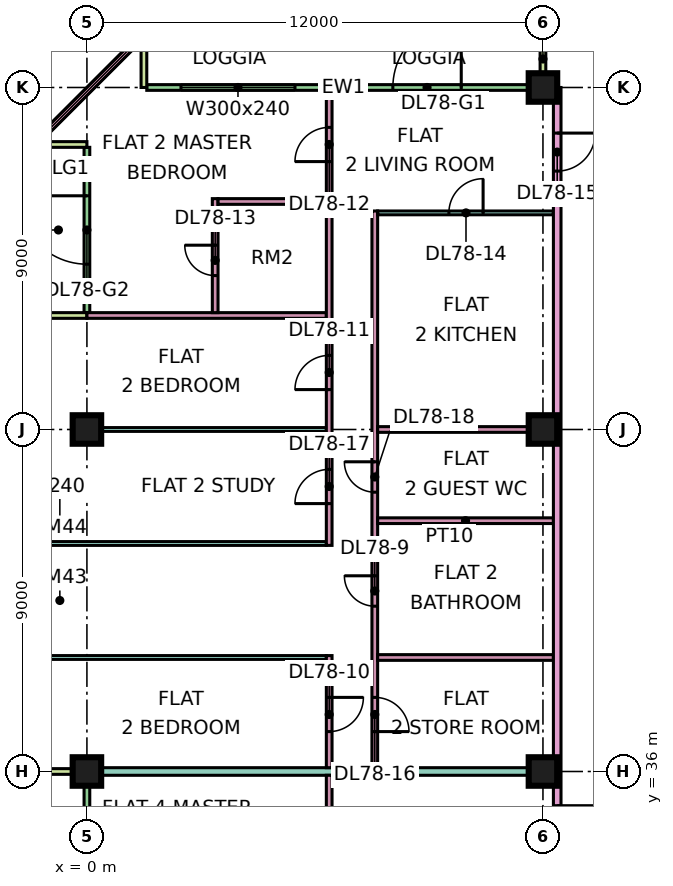
"""IFC4 building model, lengths in metres.
Left out: names, types, materials, properties, quantities, classifications, styles, units other than length and angle.
Written with IfcOpenShell. Run it as: python <this file> out.ifc"""

import sys

from ifc_helpers import new_model, si_unit, direction, frame, frame_2d, origin, origin_2d, place, context, subcontext, project, spatial, rectangle, extrude, element, fill, save


model = new_model("IFC4")
c1 = context("Model", 3, precision=1e-05, world=origin(), true_north=direction((0.0, 1.0)))
c2 = subcontext(c1, "Body", "Model", "MODEL_VIEW")
j1 = project(units=[si_unit("LENGTHUNIT", "METRE"), si_unit("PLANEANGLEUNIT", "RADIAN")], contexts=[c1])
p1 = place(None, origin())
s1 = spatial("IfcSite", under=j1, at=p1, CompositionType="ELEMENT")
p2 = place(p1, origin())
s2 = spatial("IfcBuilding", under=s1, at=p2, CompositionType="ELEMENT")
p3 = place(p2, frame((0.0, 0.0, 338.9)))
s3 = spatial("IfcBuildingStorey", under=s2, at=p3, CompositionType="ELEMENT", Elevation=338.9)
p4 = place(p3, frame((0.0, 36.0, 0.0), z_axis=(0.0, 0.0, 1.0), x_axis=(1.0, 0.0, 0.0)))
e1 = element("IfcColumn", 1, at=p4, inside=s3, PredefinedType="COLUMN", context=c2, shape_type="SweptSolid", body=[
    extrude(rectangle(XDim=0.75, YDim=0.75, at=origin_2d()), origin(), (0.0, 0.0, 1.0), 3.75),
])
p5 = place(p3, frame((0.0, 45.0, 0.0), z_axis=(0.0, 0.0, 1.0), x_axis=(1.0, 0.0, 0.0)))
e2 = element("IfcColumn", 2, at=p5, inside=s3, PredefinedType="COLUMN", context=c2, shape_type="SweptSolid", body=[
    extrude(rectangle(XDim=0.75, YDim=0.75, at=origin_2d()), origin(), (0.0, 0.0, 1.0), 3.75),
])
for number, where, z_axis, x_axis in (
    (3, (12.0, 36.0, 0.0), (0.0, 0.0, 1.0), (1.0, 0.0, 0.0)),
    (4, (12.0, 45.0, 0.0), (0.0, 0.0, 1.0), (1.0, 0.0, 0.0)),
    (5, (12.0, 54.0, 0.0), (0.0, 0.0, 1.0), (1.0, 0.0, 0.0)),
):
    element("IfcColumn", number, at=place(p3, frame(where, z_axis=z_axis, x_axis=x_axis)), inside=s3, PredefinedType="COLUMN", context=c2, shape_type="SweptSolid", body=[
        extrude(rectangle(XDim=0.75, YDim=0.75, at=origin_2d()), origin(), (0.0, 0.0, 1.0), 3.75),
    ])
p6 = place(p3, frame((11.925, 54.0, 0.0), z_axis=(0.0, 0.0, 1.0), x_axis=(-1.0, 0.0, 0.0)))
e6 = element("IfcWall", 6, at=p6, inside=s3, PredefinedType="SOLIDWALL", context=c2, shape_type="SweptSolid", body=[
    extrude(rectangle(XDim=10.35, YDim=0.15, at=frame_2d((5.175, 0.0))), origin(), (0.0, 0.0, 1.0), 3.35),
])
p7 = place(p6, frame((2.075, 0.0, 0.0)))
e7 = element("IfcOpeningElement", 7, at=p7, cuts=e6, PredefinedType="OPENING", context=c2, shape_type="SweptSolid", body=[
    extrude(rectangle(XDim=1.8, YDim=2.4, at=frame_2d((0.9, 1.2))), frame((0.0, 0.085, 0.0), z_axis=(0.0, -1.0, 0.0), x_axis=(1.0, 0.0, 0.0)), (0.0, 0.0, 1.0), 0.17),
])
p8 = place(p6, frame((6.45, 0.0, 0.45)))
e8 = element("IfcOpeningElement", 8, at=p8, cuts=e6, PredefinedType="OPENING", context=c2, shape_type="SweptSolid", body=[
    extrude(rectangle(XDim=3.0, YDim=2.4, at=frame_2d((1.5, 1.2))), frame((0.0, 0.085, 0.0), z_axis=(0.0, -1.0, 0.0), x_axis=(1.0, 0.0, 0.0)), (0.0, 0.0, 1.0), 0.17),
])
for number, where, z_axis, x_axis in (
    (9, (12.0, 55.5, 0.0), (0.0, 0.0, 1.0), (0.0, -1.0, 0.0)),
    (10, (1.5, 55.5, 0.0), (0.0, 0.0, 1.0), (0.0, -1.0, 0.0)),
):
    element("IfcWall", number, at=place(p3, frame(where, z_axis=z_axis, x_axis=x_axis)), inside=s3, PredefinedType="SOLIDWALL", context=c2, shape_type="SweptSolid", body=[
        extrude(rectangle(XDim=1.5, YDim=0.15, at=frame_2d((0.75, 0.0))), origin(), (0.0, 0.0, 1.0), 3.35),
    ])
p9 = place(p3, frame((1.553, 55.447, 0.0), z_axis=(0.0, 0.0, 1.0), x_axis=(-0.707106781187, -0.707106781187, 0.0)))
e11 = element("IfcWall", 11, at=p9, inside=s3, PredefinedType="SOLIDWALL", context=c2, shape_type="SweptSolid", body=[
    extrude(rectangle(XDim=4.243, YDim=0.15, at=frame_2d((2.121, 0.0))), origin(), (0.0, 0.0, 1.0), 3.35),
])
p10 = place(p9, frame((0.621, 0.0, 0.45)))
e12 = element("IfcOpeningElement", 12, at=p10, cuts=e11, PredefinedType="OPENING", context=c2, shape_type="SweptSolid", body=[
    extrude(rectangle(XDim=3.0, YDim=2.4, at=frame_2d((1.5, 1.2))), frame((0.0, 0.085, 0.0), z_axis=(0.0, -1.0, 0.0), x_axis=(1.0, 0.0, 0.0)), (0.0, 0.0, 1.0), 0.17),
])
p11 = place(p3, frame((0.0, 52.425, 0.0), z_axis=(0.0, 0.0, 1.0), x_axis=(0.0, -1.0, 0.0)))
e13 = element("IfcWall", 13, at=p11, inside=s3, PredefinedType="SOLIDWALL", context=c2, shape_type="SweptSolid", body=[
    extrude(rectangle(XDim=4.35, YDim=0.15, at=frame_2d((2.175, 0.0))), origin(), (0.0, 0.0, 1.0), 3.35),
])
p12 = place(p11, frame((1.275, 0.0, 0.0)))
e14 = element("IfcOpeningElement", 14, at=p12, cuts=e13, PredefinedType="OPENING", context=c2, shape_type="SweptSolid", body=[
    extrude(rectangle(XDim=1.8, YDim=2.4, at=frame_2d((0.9, 1.2))), frame((0.0, 0.085, 0.0), z_axis=(0.0, -1.0, 0.0), x_axis=(1.0, 0.0, 0.0)), (0.0, 0.0, 1.0), 0.17),
])
for number, where, z_axis, x_axis in (
    (15, (-1.5, 52.5, 0.0), (0.0, 0.0, 1.0), (1.0, 0.0, 0.0)),
    (16, (-1.5, 48.0, 0.0), (0.0, 0.0, 1.0), (1.0, 0.0, 0.0)),
):
    element("IfcWall", number, at=place(p3, frame(where, z_axis=z_axis, x_axis=x_axis)), inside=s3, PredefinedType="SOLIDWALL", context=c2, shape_type="SweptSolid", body=[
        extrude(rectangle(XDim=1.5, YDim=0.15, at=frame_2d((0.75, 0.0))), origin(), (0.0, 0.0, 1.0), 3.35),
    ])
p13 = place(p3, frame((0.0, 35.925, 0.0), z_axis=(0.0, 0.0, 1.0), x_axis=(0.0, -1.0, 0.0)))
e17 = element("IfcWall", 17, at=p13, inside=s3, PredefinedType="SOLIDWALL", context=c2, shape_type="SweptSolid", body=[
    extrude(rectangle(XDim=11.85, YDim=0.15, at=frame_2d((5.925, 0.0))), origin(), (0.0, 0.0, 1.0), 3.35),
])
p14 = place(p13, frame((2.262, 0.0, 0.0)))
e18 = element("IfcOpeningElement", 18, at=p14, cuts=e17, PredefinedType="OPENING", context=c2, shape_type="SweptSolid", body=[
    extrude(rectangle(XDim=1.8, YDim=2.4, at=frame_2d((0.9, 1.2))), frame((0.0, 0.085, 0.0), z_axis=(0.0, -1.0, 0.0), x_axis=(1.0, 0.0, 0.0)), (0.0, 0.0, 1.0), 0.17),
])
p15 = place(p13, frame((7.188, 0.0, 0.45)))
e19 = element("IfcOpeningElement", 19, at=p15, cuts=e17, PredefinedType="OPENING", context=c2, shape_type="SweptSolid", body=[
    extrude(rectangle(XDim=3.0, YDim=2.4, at=frame_2d((1.5, 1.2))), frame((0.0, 0.085, 0.0), z_axis=(0.0, -1.0, 0.0), x_axis=(1.0, 0.0, 0.0)), (0.0, 0.0, 1.0), 0.17),
])
p16 = place(p3, frame((-1.5, 36.0, 0.0), z_axis=(0.0, 0.0, 1.0), x_axis=(1.0, 0.0, 0.0)))
e20 = element("IfcWall", 20, at=p16, inside=s3, PredefinedType="SOLIDWALL", context=c2, shape_type="SweptSolid", body=[
    extrude(rectangle(XDim=1.5, YDim=0.15, at=frame_2d((0.75, 0.0))), origin(), (0.0, 0.0, 1.0), 3.35),
])
e21 = element("IfcWall", 21, at=p4, inside=s3, PredefinedType="PARTITIONING", context=c2, shape_type="SweptSolid", body=[
    extrude(rectangle(XDim=12.275, YDim=0.2, at=frame_2d((6.137, 0.0))), origin(), (0.0, 0.0, 1.0), 3.35),
])
for number, where, z_axis, x_axis in (
    (22, (-1.35, 39.0, 0.0), (0.0, 0.0, 1.0), (1.0, 0.0, 0.0)),
    (23, (-1.35, 42.0, 0.0), (0.0, 0.0, 1.0), (1.0, 0.0, 0.0)),
):
    element("IfcWall", number, at=place(p3, frame(where, z_axis=z_axis, x_axis=x_axis)), inside=s3, PredefinedType="PARTITIONING", context=c2, shape_type="SweptSolid", body=[
        extrude(rectangle(XDim=7.65, YDim=0.1, at=frame_2d((3.825, 0.0))), origin(), (0.0, 0.0, 1.0), 3.35),
    ])
e24 = element("IfcWall", 24, at=p5, inside=s3, PredefinedType="PARTITIONING", context=c2, shape_type="SweptSolid", body=[
    extrude(rectangle(XDim=6.3, YDim=0.1, at=frame_2d((3.15, 0.0))), origin(), (0.0, 0.0, 1.0), 3.35),
])
p17 = place(p3, frame((0.0, 48.0, 0.0), z_axis=(0.0, 0.0, 1.0), x_axis=(1.0, 0.0, 0.0)))
e25 = element("IfcWall", 25, at=p17, inside=s3, PredefinedType="PARTITIONING", context=c2, shape_type="SweptSolid", body=[
    extrude(rectangle(XDim=6.3, YDim=0.15, at=frame_2d((3.15, 0.0))), origin(), (0.0, 0.0, 1.0), 3.35),
])
p18 = place(p3, frame((3.375, 48.075, 0.0), z_axis=(0.0, 0.0, 1.0), x_axis=(0.0, 1.0, 0.0)))
e26 = element("IfcWall", 26, at=p18, inside=s3, PredefinedType="PARTITIONING", context=c2, shape_type="SweptSolid", body=[
    extrude(rectangle(XDim=3.0, YDim=0.15, at=frame_2d((1.5, 0.0))), origin(), (0.0, 0.0, 1.0), 3.35),
])
p19 = place(p18, frame((0.975, 0.0, 0.0)))
e27 = element("IfcOpeningElement", 27, at=p19, cuts=e26, PredefinedType="OPENING", context=c2, shape_type="SweptSolid", body=[
    extrude(rectangle(XDim=0.8, YDim=2.1, at=frame_2d((0.4, 1.05))), frame((0.0, 0.085, 0.0), z_axis=(0.0, -1.0, 0.0), x_axis=(1.0, 0.0, 0.0)), (0.0, 0.0, 1.0), 0.17),
])
p20 = place(p3, frame((3.45, 51.0, 0.0), z_axis=(0.0, 0.0, 1.0), x_axis=(1.0, 0.0, 0.0)))
e28 = element("IfcWall", 28, at=p20, inside=s3, PredefinedType="PARTITIONING", context=c2, shape_type="SweptSolid", body=[
    extrude(rectangle(XDim=2.85, YDim=0.15, at=frame_2d((1.425, 0.0))), origin(), (0.0, 0.0, 1.0), 3.35),
])
p21 = place(p3, frame((6.375, 30.075, 0.0), z_axis=(0.0, 0.0, 1.0), x_axis=(0.0, 1.0, 0.0)))
e29 = element("IfcWall", 29, at=p21, inside=s3, PredefinedType="PARTITIONING", context=c2, shape_type="SweptSolid", body=[
    extrude(rectangle(XDim=5.825, YDim=0.15, at=frame_2d((2.913, 0.0))), origin(), (0.0, 0.0, 1.0), 3.35),
])
p22 = place(p21, frame((3.975, 0.0, 0.0)))
e30 = element("IfcOpeningElement", 30, at=p22, cuts=e29, PredefinedType="OPENING", context=c2, shape_type="SweptSolid", body=[
    extrude(rectangle(XDim=0.9, YDim=2.1, at=frame_2d((0.45, 1.05))), frame((0.0, 0.085, 0.0), z_axis=(0.0, -1.0, 0.0), x_axis=(1.0, 0.0, 0.0)), (0.0, 0.0, 1.0), 0.17),
])
p23 = place(p3, frame((6.375, 36.1, 0.0), z_axis=(0.0, 0.0, 1.0), x_axis=(0.0, 1.0, 0.0)))
e31 = element("IfcWall", 31, at=p23, inside=s3, PredefinedType="PARTITIONING", context=c2, shape_type="SweptSolid", body=[
    extrude(rectangle(XDim=2.95, YDim=0.15, at=frame_2d((1.475, 0.0))), origin(), (0.0, 0.0, 1.0), 3.35),
])
p24 = place(p23, frame((0.95, 0.0, 0.0)))
e32 = element("IfcOpeningElement", 32, at=p24, cuts=e31, PredefinedType="OPENING", context=c2, shape_type="SweptSolid", body=[
    extrude(rectangle(XDim=0.9, YDim=2.1, at=frame_2d((0.45, 1.05))), frame((0.0, 0.085, 0.0), z_axis=(0.0, -1.0, 0.0), x_axis=(1.0, 0.0, 0.0)), (0.0, 0.0, 1.0), 0.17),
])
p25 = place(p3, frame((6.375, 41.95, 0.0), z_axis=(0.0, 0.0, 1.0), x_axis=(0.0, 1.0, 0.0)))
e33 = element("IfcWall", 33, at=p25, inside=s3, PredefinedType="PARTITIONING", context=c2, shape_type="SweptSolid", body=[
    extrude(rectangle(XDim=11.976, YDim=0.15, at=frame_2d((5.988, 0.0))), origin(), (0.0, 0.0, 1.0), 3.35),
])
p26 = place(p25, frame((4.1, 0.0, 0.0)))
e34 = element("IfcOpeningElement", 34, at=p26, cuts=e33, PredefinedType="OPENING", context=c2, shape_type="SweptSolid", body=[
    extrude(rectangle(XDim=0.9, YDim=2.1, at=frame_2d((0.45, 1.05))), frame((0.0, 0.085, 0.0), z_axis=(0.0, -1.0, 0.0), x_axis=(1.0, 0.0, 0.0)), (0.0, 0.0, 1.0), 0.17),
])
p27 = place(p25, frame((10.1, 0.0, 0.0)))
e35 = element("IfcOpeningElement", 35, at=p27, cuts=e33, PredefinedType="OPENING", context=c2, shape_type="SweptSolid", body=[
    extrude(rectangle(XDim=0.9, YDim=2.1, at=frame_2d((0.45, 1.05))), frame((0.0, 0.085, 0.0), z_axis=(0.0, -1.0, 0.0), x_axis=(1.0, 0.0, 0.0)), (0.0, 0.0, 1.0), 0.17),
])
p28 = place(p25, frame((1.1, 0.0, 0.0)))
e36 = element("IfcOpeningElement", 36, at=p28, cuts=e33, PredefinedType="OPENING", context=c2, shape_type="SweptSolid", body=[
    extrude(rectangle(XDim=0.9, YDim=2.1, at=frame_2d((0.45, 1.05))), frame((0.0, 0.085, 0.0), z_axis=(0.0, -1.0, 0.0), x_axis=(1.0, 0.0, 0.0)), (0.0, 0.0, 1.0), 0.17),
])
p29 = place(p3, frame((7.575, 36.1, 0.0), z_axis=(0.0, 0.0, 1.0), x_axis=(0.0, 1.0, 0.0)))
e37 = element("IfcWall", 37, at=p29, inside=s3, PredefinedType="PARTITIONING", context=c2, shape_type="SweptSolid", body=[
    extrude(rectangle(XDim=14.65, YDim=0.15, at=frame_2d((7.325, 0.0))), origin(), (0.0, 0.0, 1.0), 3.35),
])
p30 = place(p29, frame((4.25, 0.0, 0.0)))
e38 = element("IfcOpeningElement", 38, at=p30, cuts=e37, PredefinedType="OPENING", context=c2, shape_type="SweptSolid", body=[
    extrude(rectangle(XDim=0.8, YDim=2.1, at=frame_2d((0.4, 1.05))), frame((0.0, 0.085, 0.0), z_axis=(0.0, -1.0, 0.0), x_axis=(1.0, 0.0, 0.0)), (0.0, 0.0, 1.0), 0.17),
])
p31 = place(p29, frame((0.95, 0.0, 0.0)))
e39 = element("IfcOpeningElement", 39, at=p31, cuts=e37, PredefinedType="OPENING", context=c2, shape_type="SweptSolid", body=[
    extrude(rectangle(XDim=0.9, YDim=2.1, at=frame_2d((0.45, 1.05))), frame((0.0, 0.085, 0.0), z_axis=(0.0, -1.0, 0.0), x_axis=(1.0, 0.0, 0.0)), (0.0, 0.0, 1.0), 0.17),
])
p32 = place(p29, frame((7.25, 0.0, 0.0)))
e40 = element("IfcOpeningElement", 40, at=p32, cuts=e37, PredefinedType="OPENING", context=c2, shape_type="SweptSolid", body=[
    extrude(rectangle(XDim=0.8, YDim=2.1, at=frame_2d((0.4, 1.05))), frame((0.0, 0.085, 0.0), z_axis=(0.0, -1.0, 0.0), x_axis=(1.0, 0.0, 0.0)), (0.0, 0.0, 1.0), 0.17),
])
for number, where, z_axis, x_axis in (
    (41, (7.65, 39.0, 0.0), (0.0, 0.0, 1.0), (1.0, 0.0, 0.0)),
    (42, (7.65, 42.6, 0.0), (0.0, 0.0, 1.0), (1.0, 0.0, 0.0)),
    (43, (7.65, 45.0, 0.0), (0.0, 0.0, 1.0), (1.0, 0.0, 0.0)),
):
    element("IfcWall", number, at=place(p3, frame(where, z_axis=z_axis, x_axis=x_axis)), inside=s3, PredefinedType="PARTITIONING", context=c2, shape_type="SweptSolid", body=[
        extrude(rectangle(XDim=4.625, YDim=0.15, at=frame_2d((2.312, 0.0))), origin(), (0.0, 0.0, 1.0), 3.35),
    ])
p33 = place(p3, frame((7.65, 50.7, 0.0), z_axis=(0.0, 0.0, 1.0), x_axis=(1.0, 0.0, 0.0)))
e44 = element("IfcWall", 44, at=p33, inside=s3, PredefinedType="PARTITIONING", context=c2, shape_type="SweptSolid", body=[
    extrude(rectangle(XDim=4.625, YDim=0.1, at=frame_2d((2.312, 0.0))), origin(), (0.0, 0.0, 1.0), 3.35),
])
p34 = place(p33, frame((1.875, 0.0, 0.0)))
e45 = element("IfcOpeningElement", 45, at=p34, cuts=e44, PredefinedType="OPENING", context=c2, shape_type="SweptSolid", body=[
    extrude(rectangle(XDim=0.9, YDim=2.1, at=frame_2d((0.45, 1.05))), frame((0.0, 0.06, 0.0), z_axis=(0.0, -1.0, 0.0), x_axis=(1.0, 0.0, 0.0)), (0.0, 0.0, 1.0), 0.12),
])
p35 = place(p3, frame((12.375, 20.0, 0.0), z_axis=(0.0, 0.0, 1.0), x_axis=(0.0, 1.0, 0.0)))
e46 = element("IfcWall", 46, at=p35, inside=s3, PredefinedType="PARTITIONING", context=c2, shape_type="SweptSolid", body=[
    extrude(rectangle(XDim=34.0, YDim=0.2, at=frame_2d((17.0, 0.0))), origin(), (0.0, 0.0, 1.0), 3.35),
])
p36 = place(p35, frame((31.8, 0.0, 0.0)))
e47 = element("IfcOpeningElement", 47, at=p36, cuts=e46, PredefinedType="OPENING", context=c2, shape_type="SweptSolid", body=[
    extrude(rectangle(XDim=1.0, YDim=2.1, at=frame_2d((0.5, 1.05))), frame((0.0, 0.11, 0.0), z_axis=(0.0, -1.0, 0.0), x_axis=(1.0, 0.0, 0.0)), (0.0, 0.0, 1.0), 0.22),
])
p37 = place(p35, frame((0.6, 0.0, 0.0)))
e48 = element("IfcOpeningElement", 48, at=p37, cuts=e46, PredefinedType="OPENING", context=c2, shape_type="SweptSolid", body=[
    extrude(rectangle(XDim=1.2, YDim=2.1, at=frame_2d((0.6, 1.05))), frame((0.0, 0.11, 0.0), z_axis=(0.0, -1.0, 0.0), x_axis=(1.0, 0.0, 0.0)), (0.0, 0.0, 1.0), 0.22),
])
p38 = place(p35, frame((14.1, 0.0, 0.0)))
e49 = element("IfcOpeningElement", 49, at=p38, cuts=e46, PredefinedType="OPENING", context=c2, shape_type="SweptSolid", body=[
    extrude(rectangle(XDim=1.0, YDim=2.1, at=frame_2d((0.5, 1.05))), frame((0.0, 0.11, 0.0), z_axis=(0.0, -1.0, 0.0), x_axis=(1.0, 0.0, 0.0)), (0.0, 0.0, 1.0), 0.22),
])
p39 = place(p7, frame((1.8, 0.0, 0.0), z_axis=(0.0, 0.0, 1.0), x_axis=(-1.0, 0.0, 0.0)))
e50 = element("IfcDoor", 50, at=p39, inside=s3, OperationType="DOUBLE_DOOR_SINGLE_SWING", PredefinedType="DOOR", context=c2, shape_type="SweptSolid", body=[
    extrude(rectangle(XDim=1.8, YDim=2.4, at=frame_2d((0.9, 1.2))), frame((0.0, 0.025, 0.0), z_axis=(0.0, -1.0, 0.0), x_axis=(1.0, 0.0, 0.0)), (0.0, 0.0, 1.0), 0.05),
])
fill(e7, e50)
p40 = place(p8, origin())
e51 = element("IfcWindow", 51, at=p40, inside=s3, PartitioningType="SINGLE_PANEL", PredefinedType="WINDOW", context=c2, shape_type="SweptSolid", body=[
    extrude(rectangle(XDim=3.0, YDim=2.4, at=frame_2d((1.5, 1.2))), frame((0.0, 0.03, 0.0), z_axis=(0.0, -1.0, 0.0), x_axis=(1.0, 0.0, 0.0)), (0.0, 0.0, 1.0), 0.06),
])
fill(e8, e51)
p41 = place(p10, origin())
e52 = element("IfcWindow", 52, at=p41, inside=s3, PartitioningType="SINGLE_PANEL", PredefinedType="WINDOW", context=c2, shape_type="SweptSolid", body=[
    extrude(rectangle(XDim=3.0, YDim=2.4, at=frame_2d((1.5, 1.2))), frame((0.0, 0.03, 0.0), z_axis=(0.0, -1.0, 0.0), x_axis=(1.0, 0.0, 0.0)), (0.0, 0.0, 1.0), 0.06),
])
fill(e12, e52)
p42 = place(p12, frame((1.8, 0.0, 0.0), z_axis=(0.0, 0.0, 1.0), x_axis=(-1.0, 0.0, 0.0)))
e53 = element("IfcDoor", 53, at=p42, inside=s3, OperationType="DOUBLE_DOOR_SINGLE_SWING", PredefinedType="DOOR", context=c2, shape_type="SweptSolid", body=[
    extrude(rectangle(XDim=1.8, YDim=2.4, at=frame_2d((0.9, 1.2))), frame((0.0, 0.025, 0.0), z_axis=(0.0, -1.0, 0.0), x_axis=(1.0, 0.0, 0.0)), (0.0, 0.0, 1.0), 0.05),
])
fill(e14, e53)
p43 = place(p30, frame((0.8, 0.0, 0.0), z_axis=(0.0, 0.0, 1.0), x_axis=(-1.0, 0.0, 0.0)))
e54 = element("IfcDoor", 54, at=p43, inside=s3, OperationType="SINGLE_SWING_RIGHT", PredefinedType="DOOR", context=c2, shape_type="SweptSolid", body=[
    extrude(rectangle(XDim=0.8, YDim=2.1, at=frame_2d((0.4, 1.05))), frame((0.0, 0.025, 0.0), z_axis=(0.0, -1.0, 0.0), x_axis=(1.0, 0.0, 0.0)), (0.0, 0.0, 1.0), 0.05),
])
fill(e38, e54)
p44 = place(p24, origin())
e55 = element("IfcDoor", 55, at=p44, inside=s3, OperationType="SINGLE_SWING_RIGHT", PredefinedType="DOOR", context=c2, shape_type="SweptSolid", body=[
    extrude(rectangle(XDim=0.9, YDim=2.1, at=frame_2d((0.45, 1.05))), frame((0.0, 0.025, 0.0), z_axis=(0.0, -1.0, 0.0), x_axis=(1.0, 0.0, 0.0)), (0.0, 0.0, 1.0), 0.05),
])
fill(e32, e55)
p45 = place(p26, origin())
e56 = element("IfcDoor", 56, at=p45, inside=s3, OperationType="SINGLE_SWING_LEFT", PredefinedType="DOOR", context=c2, shape_type="SweptSolid", body=[
    extrude(rectangle(XDim=0.9, YDim=2.1, at=frame_2d((0.45, 1.05))), frame((0.0, 0.025, 0.0), z_axis=(0.0, -1.0, 0.0), x_axis=(1.0, 0.0, 0.0)), (0.0, 0.0, 1.0), 0.05),
])
fill(e34, e56)
p46 = place(p27, origin())
e57 = element("IfcDoor", 57, at=p46, inside=s3, OperationType="SINGLE_SWING_LEFT", PredefinedType="DOOR", context=c2, shape_type="SweptSolid", body=[
    extrude(rectangle(XDim=0.9, YDim=2.1, at=frame_2d((0.45, 1.05))), frame((0.0, 0.025, 0.0), z_axis=(0.0, -1.0, 0.0), x_axis=(1.0, 0.0, 0.0)), (0.0, 0.0, 1.0), 0.05),
])
fill(e35, e57)
p47 = place(p19, frame((0.8, 0.0, 0.0), z_axis=(0.0, 0.0, 1.0), x_axis=(-1.0, 0.0, 0.0)))
e58 = element("IfcDoor", 58, at=p47, inside=s3, OperationType="SINGLE_SWING_RIGHT", PredefinedType="DOOR", context=c2, shape_type="SweptSolid", body=[
    extrude(rectangle(XDim=0.8, YDim=2.1, at=frame_2d((0.4, 1.05))), frame((0.0, 0.025, 0.0), z_axis=(0.0, -1.0, 0.0), x_axis=(1.0, 0.0, 0.0)), (0.0, 0.0, 1.0), 0.05),
])
fill(e27, e58)
p48 = place(p34, frame((0.9, 0.0, 0.0), z_axis=(0.0, 0.0, 1.0), x_axis=(-1.0, 0.0, 0.0)))
e59 = element("IfcDoor", 59, at=p48, inside=s3, OperationType="SINGLE_SWING_RIGHT", PredefinedType="DOOR", context=c2, shape_type="SweptSolid", body=[
    extrude(rectangle(XDim=0.9, YDim=2.1, at=frame_2d((0.45, 1.05))), frame((0.0, 0.025, 0.0), z_axis=(0.0, -1.0, 0.0), x_axis=(1.0, 0.0, 0.0)), (0.0, 0.0, 1.0), 0.05),
])
fill(e45, e59)
p49 = place(p36, origin())
e60 = element("IfcDoor", 60, at=p49, inside=s3, OperationType="SINGLE_SWING_RIGHT", PredefinedType="DOOR", context=c2, shape_type="SweptSolid", body=[
    extrude(rectangle(XDim=1.0, YDim=2.1, at=frame_2d((0.5, 1.05))), frame((0.0, 0.025, 0.0), z_axis=(0.0, -1.0, 0.0), x_axis=(1.0, 0.0, 0.0)), (0.0, 0.0, 1.0), 0.05),
])
fill(e47, e60)
p50 = place(p31, frame((0.9, 0.0, 0.0), z_axis=(0.0, 0.0, 1.0), x_axis=(-1.0, 0.0, 0.0)))
e61 = element("IfcDoor", 61, at=p50, inside=s3, OperationType="SINGLE_SWING_LEFT", PredefinedType="DOOR", context=c2, shape_type="SweptSolid", body=[
    extrude(rectangle(XDim=0.9, YDim=2.1, at=frame_2d((0.45, 1.05))), frame((0.0, 0.025, 0.0), z_axis=(0.0, -1.0, 0.0), x_axis=(1.0, 0.0, 0.0)), (0.0, 0.0, 1.0), 0.05),
])
fill(e39, e61)
p51 = place(p28, origin())
e62 = element("IfcDoor", 62, at=p51, inside=s3, OperationType="SINGLE_SWING_LEFT", PredefinedType="DOOR", context=c2, shape_type="SweptSolid", body=[
    extrude(rectangle(XDim=0.9, YDim=2.1, at=frame_2d((0.45, 1.05))), frame((0.0, 0.025, 0.0), z_axis=(0.0, -1.0, 0.0), x_axis=(1.0, 0.0, 0.0)), (0.0, 0.0, 1.0), 0.05),
])
fill(e36, e62)
p52 = place(p32, frame((0.8, 0.0, 0.0), z_axis=(0.0, 0.0, 1.0), x_axis=(-1.0, 0.0, 0.0)))
e63 = element("IfcDoor", 63, at=p52, inside=s3, OperationType="SINGLE_SWING_RIGHT", PredefinedType="DOOR", context=c2, shape_type="SweptSolid", body=[
    extrude(rectangle(XDim=0.8, YDim=2.1, at=frame_2d((0.4, 1.05))), frame((0.0, 0.025, 0.0), z_axis=(0.0, -1.0, 0.0), x_axis=(1.0, 0.0, 0.0)), (0.0, 0.0, 1.0), 0.05),
])
fill(e40, e63)
p53 = place(p38, origin())
e64 = element("IfcDoor", 64, at=p53, inside=s3, OperationType="SINGLE_SWING_RIGHT", PredefinedType="DOOR", context=c2, shape_type="SweptSolid", body=[
    extrude(rectangle(XDim=1.0, YDim=2.1, at=frame_2d((0.5, 1.05))), frame((0.0, 0.025, 0.0), z_axis=(0.0, -1.0, 0.0), x_axis=(1.0, 0.0, 0.0)), (0.0, 0.0, 1.0), 0.05),
])
fill(e49, e64)
save(model, sys.argv[1])
